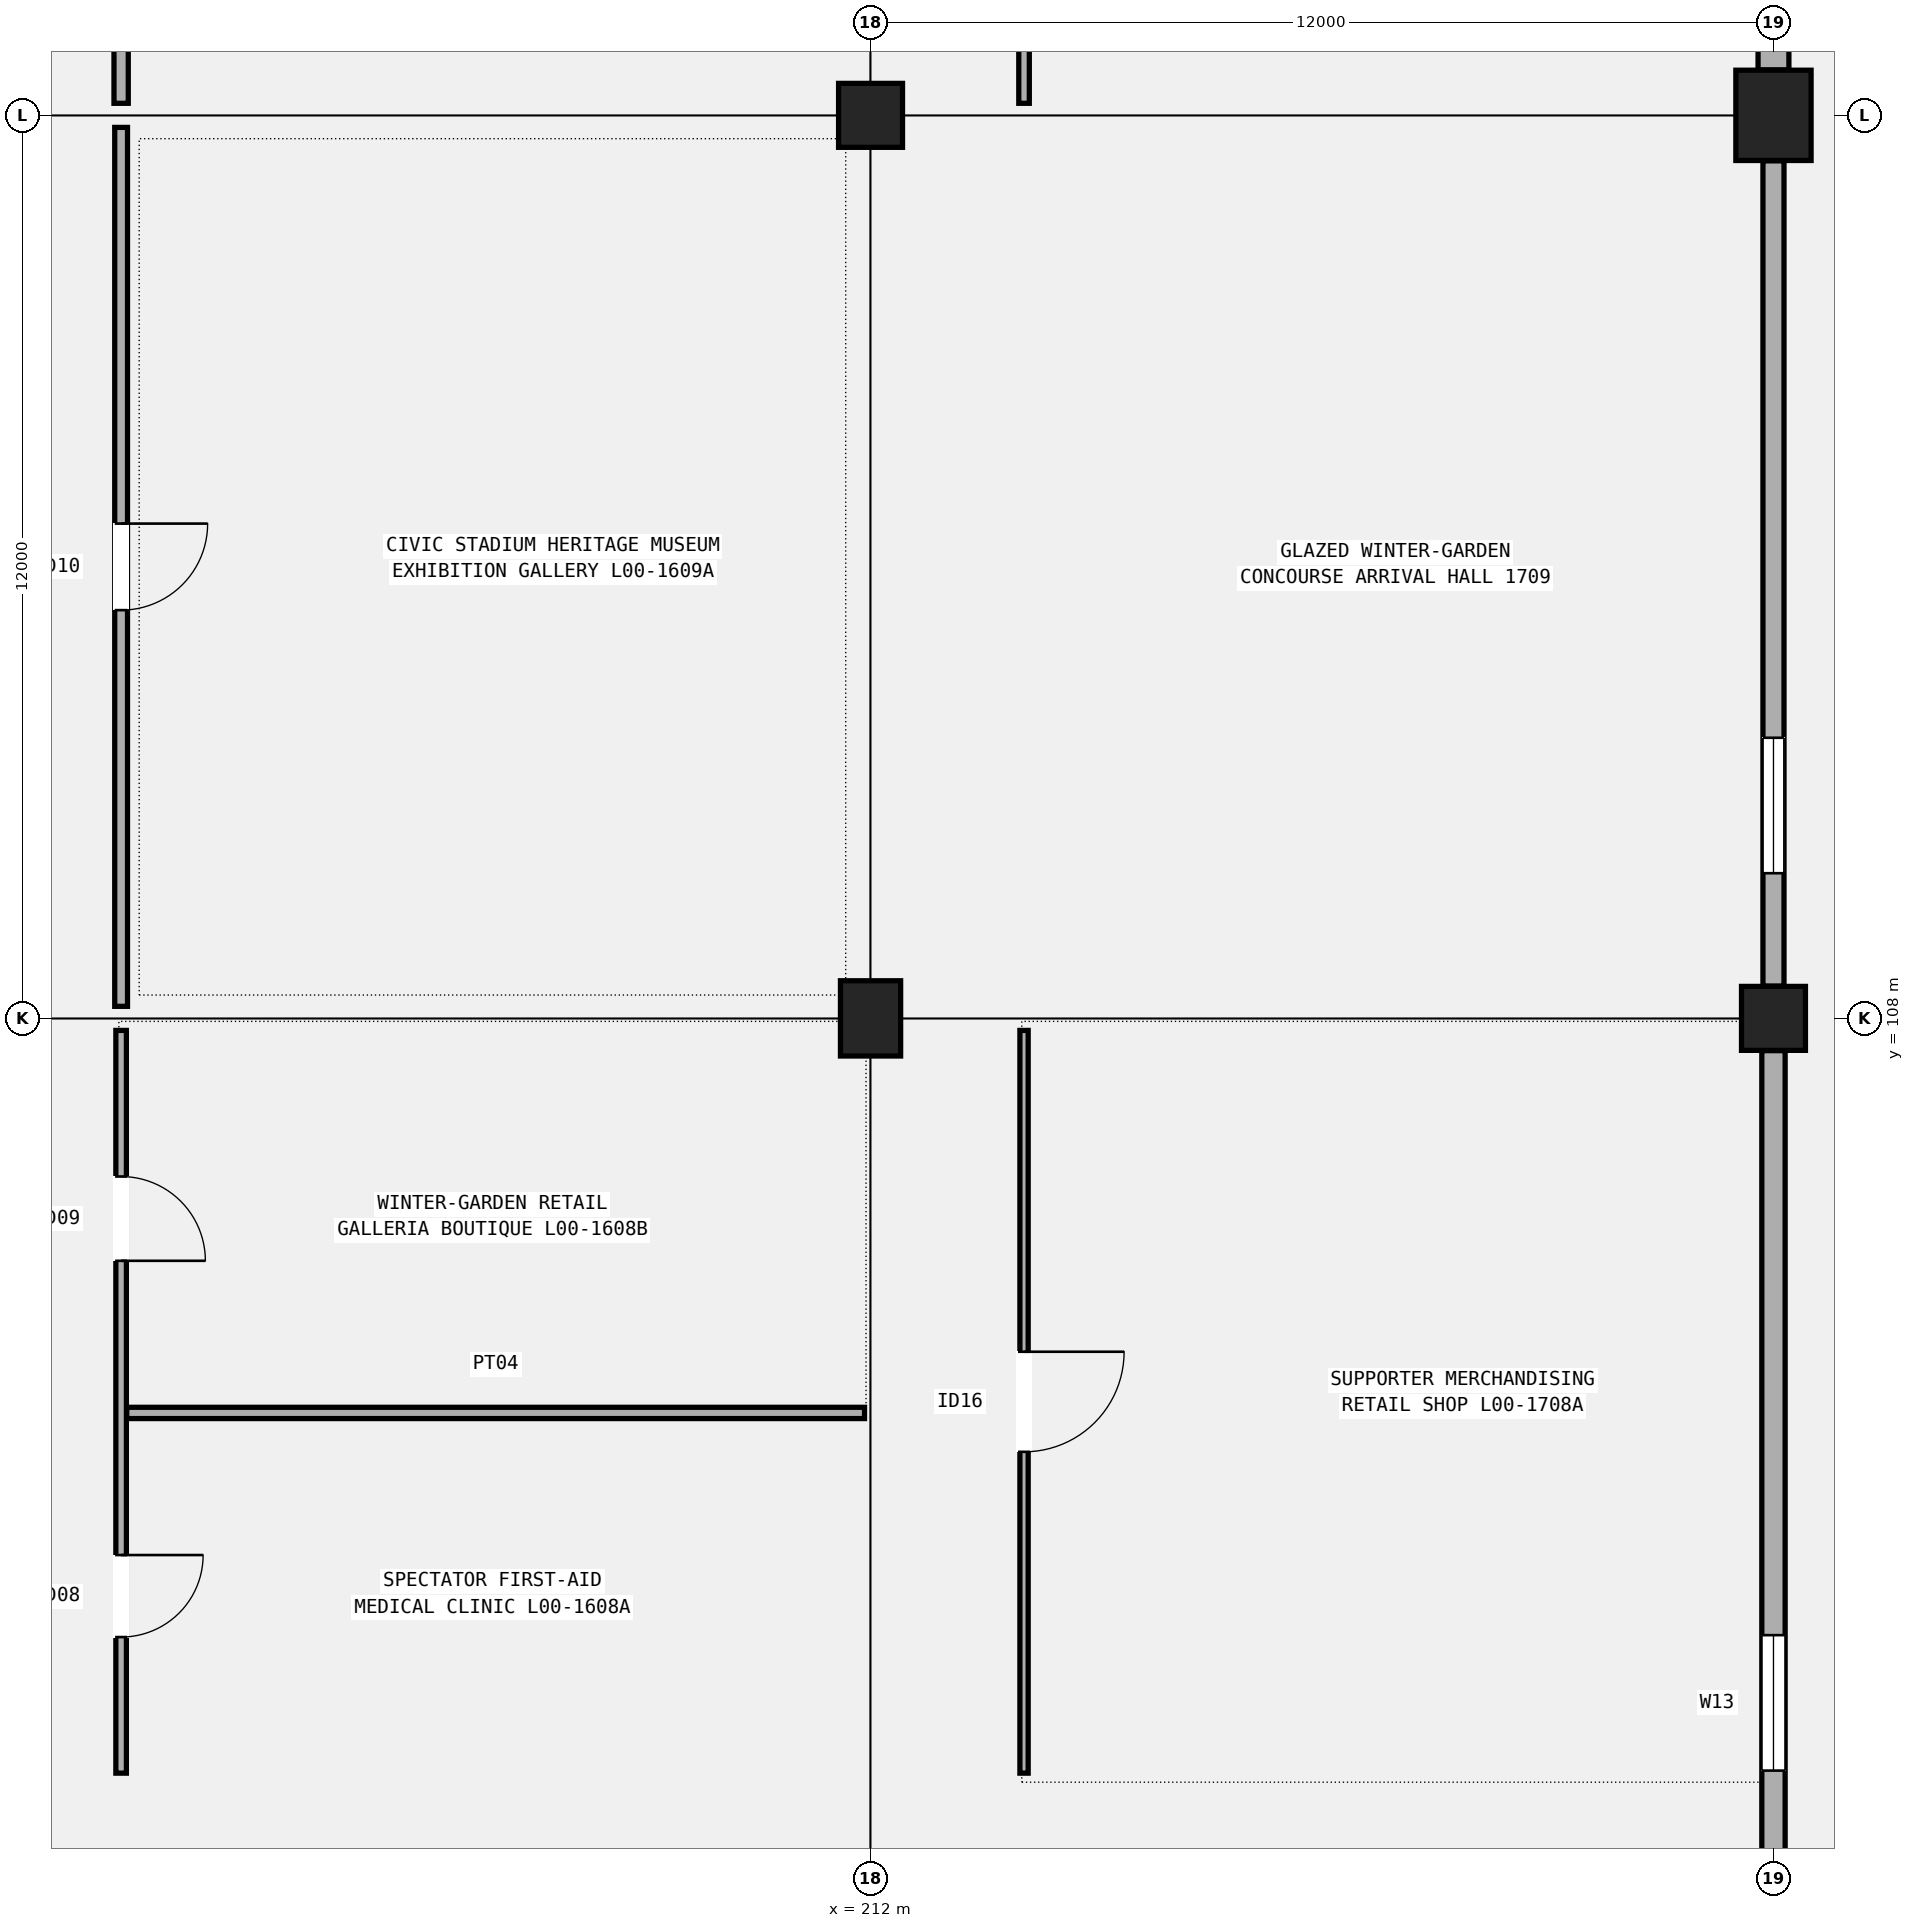
"""IFC4 building model, lengths in metres.
Left out: names, types, materials, properties, quantities, classifications, styles, units other than length and angle.
Written with IfcOpenShell. Run it as: python <this file> out.ifc"""

import sys

from ifc_helpers import new_model, si_unit, direction, frame, frame_2d, origin, origin_2d, place, context, subcontext, project, spatial, rectangle, circle, extrude, element, fill, save


model = new_model("IFC4")
c1 = context("Model", 3, precision=1e-05, world=origin(), true_north=direction((0.0, 1.0)))
c2 = subcontext(c1, "Body", "Model", "MODEL_VIEW")
j1 = project(units=[si_unit("LENGTHUNIT", "METRE"), si_unit("PLANEANGLEUNIT", "RADIAN")], contexts=[c1])
p1 = place(None, origin())
s1 = spatial("IfcSite", under=j1, at=p1, CompositionType="ELEMENT")
p2 = place(p1, origin())
s2 = spatial("IfcBuilding", under=s1, at=p2, CompositionType="ELEMENT")
p3 = place(p2, origin())
s3 = spatial("IfcBuildingStorey", under=s2, at=p3, CompositionType="ELEMENT", Elevation=0.0)
p4 = place(p3, frame((212.0, 108.0, 0.0), z_axis=(0.0, 0.0, 1.0), x_axis=(1.0, 0.0, 0.0)))
e1 = element("IfcColumn", 1, at=p4, inside=s3, PredefinedType="COLUMN", context=c2, shape_type="SweptSolid", body=[
    extrude(rectangle(XDim=0.8, YDim=1.0, at=origin_2d()), origin(), (0.0, 0.0, 1.0), 5.4),
])
for number, where, z_axis, x_axis in (
    (2, (212.0, 120.0, 0.0), (0.0, 0.0, 1.0), (1.0, 0.0, 0.0)),
    (3, (224.0, 108.0, 0.0), (0.0, 0.0, 1.0), (1.0, 0.0, 0.0)),
):
    element("IfcColumn", number, at=place(p3, frame(where, z_axis=z_axis, x_axis=x_axis)), inside=s3, PredefinedType="COLUMN", context=c2, shape_type="SweptSolid", body=[
        extrude(circle(Radius=0.425, at=origin_2d()), origin(), (0.0, 0.0, 1.0), 5.4),
    ])
p5 = place(p3, frame((224.0, 120.0, 0.0), z_axis=(0.0, 0.0, 1.0), x_axis=(1.0, 0.0, 0.0)))
e4 = element("IfcColumn", 4, at=p5, inside=s3, PredefinedType="COLUMN", context=c2, shape_type="SweptSolid", body=[
    extrude(rectangle(XDim=1.0, YDim=1.2, at=origin_2d()), origin(), (0.0, 0.0, 1.0), 5.4),
])
p6 = place(p3, frame((224.0, 96.504, 0.0), z_axis=(0.0, 0.0, 1.0), x_axis=(0.0, 1.0, 0.0)))
e5 = element("IfcWall", 5, at=p6, inside=s3, PredefinedType="SOLIDWALL", context=c2, shape_type="SweptSolid", body=[
    extrude(rectangle(XDim=11.067, YDim=0.31, at=frame_2d((5.534, 0.0))), origin(), (0.0, 0.0, 1.0), 4.44),
])
p7 = place(p6, frame((1.5, 0.0, 0.95)))
e6 = element("IfcOpeningElement", 6, at=p7, cuts=e5, PredefinedType="OPENING", context=c2, shape_type="SweptSolid", body=[
    extrude(rectangle(XDim=1.8, YDim=1.75, at=frame_2d((0.9, 0.875))), frame((0.0, 0.165, 0.0), z_axis=(0.0, -1.0, 0.0), x_axis=(1.0, 0.0, 0.0)), (0.0, 0.0, 1.0), 0.33),
])
p8 = place(p3, frame((224.0, 108.429, 0.0), z_axis=(0.0, 0.0, 1.0), x_axis=(0.0, 1.0, 0.0)))
e7 = element("IfcWall", 7, at=p8, inside=s3, PredefinedType="SOLIDWALL", context=c2, shape_type="SweptSolid", body=[
    extrude(rectangle(XDim=10.967, YDim=0.28, at=frame_2d((5.483, 0.0))), origin(), (0.0, 0.0, 1.0), 4.24),
])
p9 = place(p8, frame((1.5, 0.0, 0.95)))
e8 = element("IfcOpeningElement", 8, at=p9, cuts=e7, PredefinedType="OPENING", context=c2, shape_type="SweptSolid", body=[
    extrude(rectangle(XDim=1.8, YDim=2.15, at=frame_2d((0.9, 1.075))), frame((0.0, 0.15, 0.0), z_axis=(0.0, -1.0, 0.0), x_axis=(1.0, 0.0, 0.0)), (0.0, 0.0, 1.0), 0.3),
])
p10 = place(p3, frame((224.0, 120.604, 0.0), z_axis=(0.0, 0.0, 1.0), x_axis=(0.0, 1.0, 0.0)))
e9 = element("IfcWall", 9, at=p10, inside=s3, PredefinedType="SOLIDWALL", context=c2, shape_type="SweptSolid", body=[
    extrude(rectangle(XDim=10.842, YDim=0.41, at=frame_2d((5.421, 0.0))), origin(), (0.0, 0.0, 1.0), 4.34),
])
p11 = place(p10, frame((1.5, 0.0, 0.95)))
e10 = element("IfcOpeningElement", 10, at=p11, cuts=e9, PredefinedType="OPENING", context=c2, shape_type="SweptSolid", body=[
    extrude(rectangle(XDim=1.95, YDim=1.9, at=frame_2d((0.975, 0.95))), frame((0.0, 0.215, 0.0), z_axis=(0.0, -1.0, 0.0), x_axis=(1.0, 0.0, 0.0)), (0.0, 0.0, 1.0), 0.43),
])
p12 = place(p3, frame((202.04, 97.97, 0.0), z_axis=(0.0, 0.0, 1.0), x_axis=(0.0, 1.0, 0.0)))
e11 = element("IfcWall", 11, at=p12, inside=s3, PredefinedType="PARTITIONING", context=c2, shape_type="SweptSolid", body=[
    extrude(rectangle(XDim=9.87, YDim=0.14, at=frame_2d((4.935, 0.0))), origin(), (0.0, 0.0, 1.0), 4.52),
])
p13 = place(p12, frame((2.899, 0.0, 0.0), z_axis=(0.0, 0.0, 1.0), x_axis=(-1.0, 0.0, 0.0)))
e12 = element("IfcOpeningElement", 12, at=p13, cuts=e11, PredefinedType="OPENING", context=c2, shape_type="SweptSolid", body=[
    extrude(rectangle(XDim=1.09, YDim=2.16, at=frame_2d((0.545, 1.08))), frame((0.0, 0.08, 0.0), z_axis=(0.0, -1.0, 0.0), x_axis=(1.0, 0.0, 0.0)), (0.0, 0.0, 1.0), 0.16),
])
p14 = place(p12, frame((7.929, 0.0, 0.0), z_axis=(0.0, 0.0, 1.0), x_axis=(-1.0, 0.0, 0.0)))
e13 = element("IfcOpeningElement", 13, at=p14, cuts=e11, PredefinedType="OPENING", context=c2, shape_type="SweptSolid", body=[
    extrude(rectangle(XDim=1.12, YDim=2.18, at=frame_2d((0.56, 1.09))), frame((0.0, 0.08, 0.0), z_axis=(0.0, -1.0, 0.0), x_axis=(1.0, 0.0, 0.0)), (0.0, 0.0, 1.0), 0.16),
])
p15 = place(p3, frame((202.115, 102.757, 0.0), z_axis=(0.0, 0.0, 1.0), x_axis=(1.0, 0.0, 0.0)))
e14 = element("IfcWall", 14, at=p15, inside=s3, PredefinedType="PARTITIONING", context=c2, shape_type="SweptSolid", body=[
    extrude(rectangle(XDim=9.805, YDim=0.15, at=frame_2d((4.902, 0.0))), origin(), (0.0, 0.0, 1.0), 4.52),
])
p16 = place(p3, frame((202.04, 108.16, 0.0), z_axis=(0.0, 0.0, 1.0), x_axis=(0.0, 1.0, 0.0)))
e15 = element("IfcWall", 15, at=p16, inside=s3, PredefinedType="PARTITIONING", context=c2, shape_type="SweptSolid", body=[
    extrude(rectangle(XDim=11.68, YDim=0.17, at=frame_2d((5.84, 0.0))), origin(), (0.0, 0.0, 1.0), 4.52),
])
p17 = place(p16, frame((6.415, 0.0, 0.0), z_axis=(0.0, 0.0, 1.0), x_axis=(-1.0, 0.0, 0.0)))
e16 = element("IfcOpeningElement", 16, at=p17, cuts=e15, PredefinedType="OPENING", context=c2, shape_type="SweptSolid", body=[
    extrude(rectangle(XDim=1.15, YDim=2.15, at=frame_2d((0.575, 1.075))), frame((0.0, 0.095, 0.0), z_axis=(0.0, -1.0, 0.0), x_axis=(1.0, 0.0, 0.0)), (0.0, 0.0, 1.0), 0.19),
])
p18 = place(p3, frame((202.04, 120.16, 0.0), z_axis=(0.0, 0.0, 1.0), x_axis=(0.0, 1.0, 0.0)))
e17 = element("IfcWall", 17, at=p18, inside=s3, PredefinedType="PARTITIONING", context=c2, shape_type="SweptSolid", body=[
    extrude(rectangle(XDim=11.668, YDim=0.19, at=frame_2d((5.834, 0.0))), origin(), (0.0, 0.0, 1.0), 4.52),
])
p19 = place(p18, frame((3.674, 0.0, 0.0), z_axis=(0.0, 0.0, 1.0), x_axis=(-1.0, 0.0, 0.0)))
e18 = element("IfcOpeningElement", 18, at=p19, cuts=e17, PredefinedType="OPENING", context=c2, shape_type="SweptSolid", body=[
    extrude(rectangle(XDim=1.18, YDim=2.2, at=frame_2d((0.59, 1.1))), frame((0.0, 0.105, 0.0), z_axis=(0.0, -1.0, 0.0), x_axis=(1.0, 0.0, 0.0)), (0.0, 0.0, 1.0), 0.21),
])
p20 = place(p18, frame((9.609, 0.0, 0.0), z_axis=(0.0, 0.0, 1.0), x_axis=(-1.0, 0.0, 0.0)))
e19 = element("IfcOpeningElement", 19, at=p20, cuts=e17, PredefinedType="OPENING", context=c2, shape_type="SweptSolid", body=[
    extrude(rectangle(XDim=1.21, YDim=2.18, at=frame_2d((0.605, 1.09))), frame((0.0, 0.105, 0.0), z_axis=(0.0, -1.0, 0.0), x_axis=(1.0, 0.0, 0.0)), (0.0, 0.0, 1.0), 0.21),
])
p21 = place(p3, frame((214.04, 97.97, 0.0), z_axis=(0.0, 0.0, 1.0), x_axis=(0.0, 1.0, 0.0)))
e20 = element("IfcWall", 20, at=p21, inside=s3, PredefinedType="PARTITIONING", context=c2, shape_type="SweptSolid", body=[
    extrude(rectangle(XDim=9.87, YDim=0.11, at=frame_2d((4.935, 0.0))), origin(), (0.0, 0.0, 1.0), 4.52),
])
p22 = place(p21, frame((5.6, 0.0, 0.0), z_axis=(0.0, 0.0, 1.0), x_axis=(-1.0, 0.0, 0.0)))
e21 = element("IfcOpeningElement", 21, at=p22, cuts=e20, PredefinedType="OPENING", context=c2, shape_type="SweptSolid", body=[
    extrude(rectangle(XDim=1.33, YDim=2.22, at=frame_2d((0.665, 1.11))), frame((0.0, 0.065, 0.0), z_axis=(0.0, -1.0, 0.0), x_axis=(1.0, 0.0, 0.0)), (0.0, 0.0, 1.0), 0.13),
])
p23 = place(p3, frame((214.04, 120.16, 0.0), z_axis=(0.0, 0.0, 1.0), x_axis=(0.0, 1.0, 0.0)))
e22 = element("IfcWall", 22, at=p23, inside=s3, PredefinedType="PARTITIONING", context=c2, shape_type="SweptSolid", body=[
    extrude(rectangle(XDim=11.613, YDim=0.14, at=frame_2d((5.807, 0.0))), origin(), (0.0, 0.0, 1.0), 4.52),
])
p24 = place(p23, frame((6.52, 0.0, 0.0), z_axis=(0.0, 0.0, 1.0), x_axis=(-1.0, 0.0, 0.0)))
e23 = element("IfcOpeningElement", 23, at=p24, cuts=e22, PredefinedType="OPENING", context=c2, shape_type="SweptSolid", body=[
    extrude(rectangle(XDim=1.36, YDim=2.25, at=frame_2d((0.68, 1.125))), frame((0.0, 0.08, 0.0), z_axis=(0.0, -1.0, 0.0), x_axis=(1.0, 0.0, 0.0)), (0.0, 0.0, 1.0), 0.16),
])
p25 = place(p7, origin())
e24 = element("IfcWindow", 24, at=p25, inside=s3, PartitioningType="SINGLE_PANEL", PredefinedType="WINDOW", context=c2, shape_type="SweptSolid", body=[
    extrude(rectangle(XDim=1.8, YDim=1.75, at=frame_2d((0.9, 0.875))), frame((0.0, 0.03, 0.0), z_axis=(0.0, -1.0, 0.0), x_axis=(1.0, 0.0, 0.0)), (0.0, 0.0, 1.0), 0.06),
])
fill(e6, e24)
p26 = place(p9, origin())
e25 = element("IfcWindow", 25, at=p26, inside=s3, PartitioningType="SINGLE_PANEL", PredefinedType="WINDOW", context=c2, shape_type="SweptSolid", body=[
    extrude(rectangle(XDim=1.8, YDim=2.15, at=frame_2d((0.9, 1.075))), frame((0.0, 0.03, 0.0), z_axis=(0.0, -1.0, 0.0), x_axis=(1.0, 0.0, 0.0)), (0.0, 0.0, 1.0), 0.06),
])
fill(e8, e25)
p27 = place(p13, origin())
e26 = element("IfcDoor", 26, at=p27, inside=s3, OperationType="SINGLE_SWING_LEFT", PredefinedType="DOOR", context=c2, shape_type="SweptSolid", body=[
    extrude(rectangle(XDim=1.09, YDim=2.16, at=frame_2d((0.545, 1.08))), frame((0.0, 0.025, 0.0), z_axis=(0.0, -1.0, 0.0), x_axis=(1.0, 0.0, 0.0)), (0.0, 0.0, 1.0), 0.05),
])
fill(e12, e26)
p28 = place(p14, origin())
e27 = element("IfcDoor", 27, at=p28, inside=s3, OperationType="SINGLE_SWING_RIGHT", PredefinedType="DOOR", context=c2, shape_type="SweptSolid", body=[
    extrude(rectangle(XDim=1.12, YDim=2.18, at=frame_2d((0.56, 1.09))), frame((0.0, 0.025, 0.0), z_axis=(0.0, -1.0, 0.0), x_axis=(1.0, 0.0, 0.0)), (0.0, 0.0, 1.0), 0.05),
])
fill(e13, e27)
p29 = place(p17, origin())
e28 = element("IfcDoor", 28, at=p29, inside=s3, OperationType="SINGLE_SWING_LEFT", PredefinedType="DOOR", context=c2, shape_type="SweptSolid", body=[
    extrude(rectangle(XDim=1.15, YDim=2.15, at=frame_2d((0.575, 1.075))), frame((0.0, 0.025, 0.0), z_axis=(0.0, -1.0, 0.0), x_axis=(1.0, 0.0, 0.0)), (0.0, 0.0, 1.0), 0.05),
])
fill(e16, e28)
p30 = place(p22, origin())
e29 = element("IfcDoor", 29, at=p30, inside=s3, OperationType="SINGLE_SWING_LEFT", PredefinedType="DOOR", context=c2, shape_type="SweptSolid", body=[
    extrude(rectangle(XDim=1.33, YDim=2.22, at=frame_2d((0.665, 1.11))), frame((0.0, 0.025, 0.0), z_axis=(0.0, -1.0, 0.0), x_axis=(1.0, 0.0, 0.0)), (0.0, 0.0, 1.0), 0.05),
])
fill(e21, e29)
save(model, sys.argv[1])
